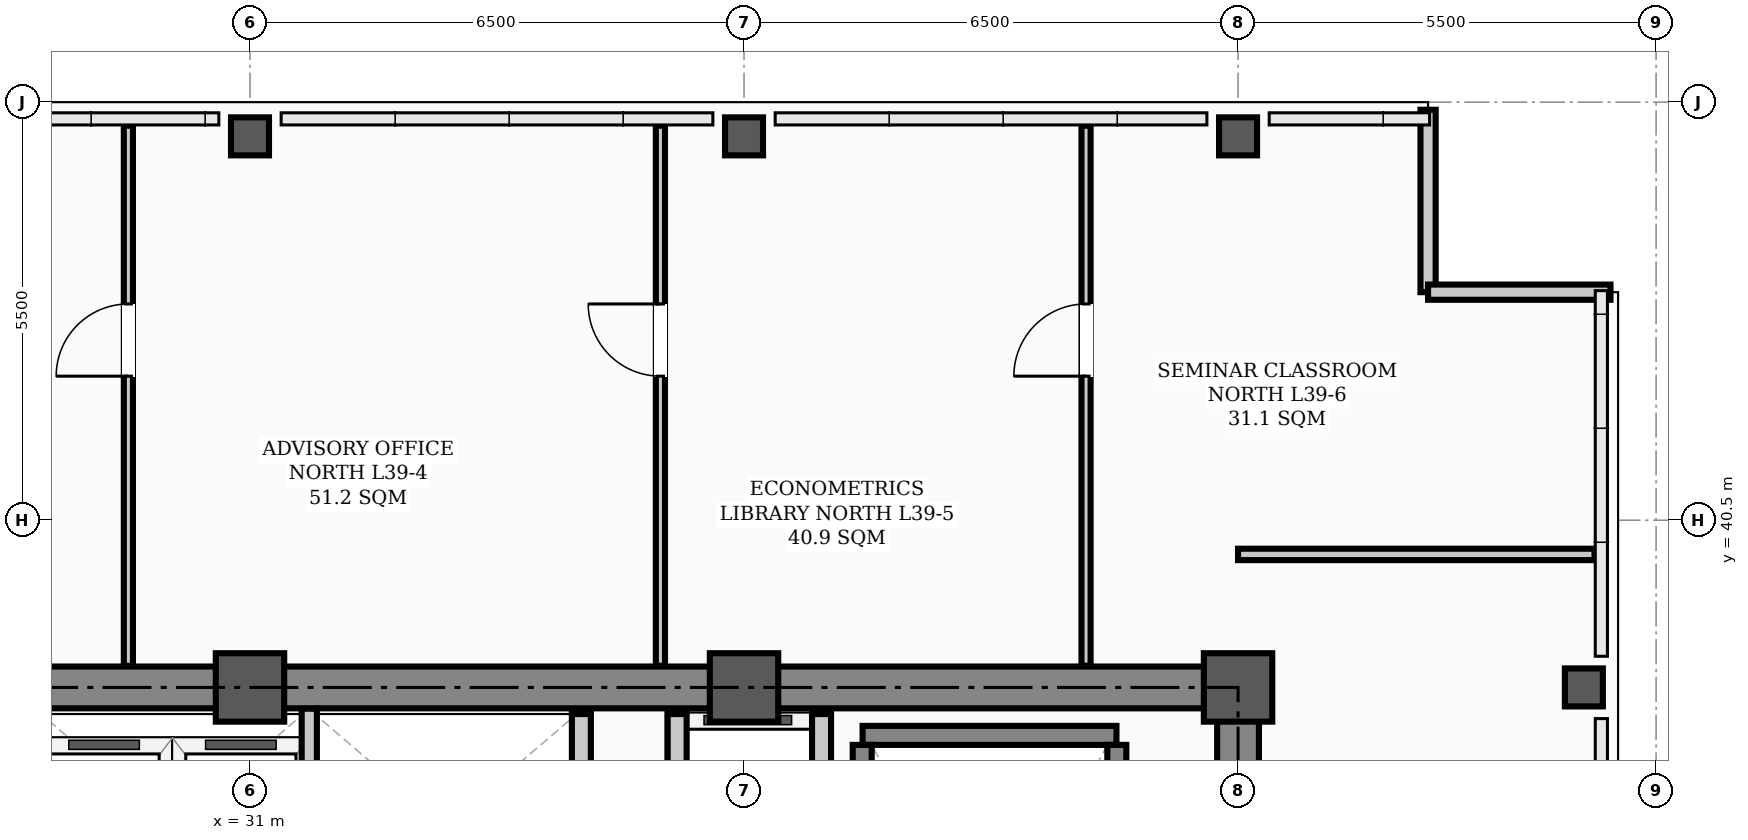
"""IFC4 building model, lengths in metres.
Left out: names, types, materials, properties, quantities, classifications, styles, units other than length and angle.
Written with IfcOpenShell. Run it as: python <this file> out.ifc"""

import sys

from ifc_helpers import new_model, si_unit, direction, frame, frame_2d, origin, origin_2d, place, context, subcontext, project, spatial, rectangle, hollow_rectangle, extrude, element, fill, save


model = new_model("IFC4")
c1 = context("Model", 3, precision=1e-05, world=origin(), true_north=direction((0.0, 1.0)))
c2 = subcontext(c1, "Body", "Model", "MODEL_VIEW")
j1 = project(units=[si_unit("LENGTHUNIT", "METRE"), si_unit("PLANEANGLEUNIT", "RADIAN")], contexts=[c1])
p1 = place(None, origin())
s1 = spatial("IfcSite", under=j1, at=p1, CompositionType="ELEMENT")
p2 = place(p1, origin())
s2 = spatial("IfcBuilding", under=s1, at=p2, CompositionType="ELEMENT")
p3 = place(p2, frame((0.0, 0.0, 157.8)))
s3 = spatial("IfcBuildingStorey", under=s2, at=p3, CompositionType="ELEMENT", Elevation=157.8)
for number, where, z_axis, x_axis in (
    (1, (31.0, 38.3, 0.0), (0.0, 0.0, 1.0), (1.0, 0.0, 0.0)),
    (2, (37.5, 38.3, 0.0), (0.0, 0.0, 1.0), (1.0, 0.0, 0.0)),
    (3, (44.0, 38.3, 0.0), (0.0, 0.0, 1.0), (1.0, 0.0, 0.0)),
):
    element("IfcColumn", number, at=place(p3, frame(where, z_axis=z_axis, x_axis=x_axis)), inside=s3, PredefinedType="COLUMN", context=c2, shape_type="SweptSolid", body=[
        extrude(hollow_rectangle(XDim=0.9, YDim=0.9, WallThickness=0.035, InnerFilletRadius=0.017, OuterFilletRadius=0.052, at=origin_2d()), origin(), (0.0, 0.0, 1.0), 3.9),
    ])
for number, where, z_axis, x_axis in (
    (4, (31.0, 45.55, 0.0), (0.0, 0.0, 1.0), (1.0, 0.0, 0.0)),
    (5, (37.5, 45.55, 0.0), (0.0, 0.0, 1.0), (1.0, 0.0, 0.0)),
    (6, (44.0, 45.55, 0.0), (0.0, 0.0, 1.0), (1.0, 0.0, 0.0)),
    (7, (48.55, 38.3, 0.0), (0.0, 0.0, 1.0), (1.0, 0.0, 0.0)),
):
    element("IfcColumn", number, at=place(p3, frame(where, z_axis=z_axis, x_axis=x_axis)), inside=s3, PredefinedType="COLUMN", context=c2, shape_type="SweptSolid", body=[
        extrude(hollow_rectangle(XDim=0.5, YDim=0.5, WallThickness=0.024, InnerFilletRadius=0.012, OuterFilletRadius=0.036, at=origin_2d()), origin(), (0.0, 0.0, 1.0), 3.9),
    ])
for number, where, z_axis, x_axis in (
    (8, (46.5, 45.9, 0.0), (0.0, 0.0, 1.0), (0.0, -1.0, 0.0)),
    (9, (46.5, 43.5, 0.0), (0.0, 0.0, 1.0), (1.0, 0.0, 0.0)),
):
    element("IfcWall", number, at=place(p3, frame(where, z_axis=z_axis, x_axis=x_axis)), inside=s3, PredefinedType="PARAPET", context=c2, shape_type="SweptSolid", body=[
        extrude(rectangle(XDim=2.4, YDim=0.2, at=frame_2d((1.2, 0.0))), origin(), (0.0, 0.0, 1.0), 1.2),
    ])
p4 = place(p3, frame((13.5, 38.3, 0.0), z_axis=(0.0, 0.0, 1.0), x_axis=(1.0, 0.0, 0.0)))
e10 = element("IfcWall", 10, at=p4, inside=s3, PredefinedType="SHEAR", context=c2, shape_type="SweptSolid", body=[
    extrude(rectangle(XDim=30.5, YDim=0.55, at=frame_2d((15.25, 0.0))), origin(), (0.0, 0.0, 1.0), 3.72),
])
p5 = place(p3, frame((44.0, 29.35, 0.0), z_axis=(0.0, 0.0, 1.0), x_axis=(0.0, 1.0, 0.0)))
e11 = element("IfcWall", 11, at=p5, inside=s3, PredefinedType="SHEAR", context=c2, shape_type="SweptSolid", body=[
    extrude(rectangle(XDim=8.6, YDim=0.55, at=frame_2d((4.3, 0.0))), origin(), (0.0, 0.0, 1.0), 3.72),
])
p6 = place(p3, frame((39.06, 37.669, 0.0), z_axis=(0.0, 0.0, 1.0), x_axis=(1.0, 0.0, 0.0)))
e12 = element("IfcWall", 12, at=p6, inside=s3, PredefinedType="STANDARD", context=c2, shape_type="SweptSolid", body=[
    extrude(rectangle(XDim=3.34, YDim=0.25, at=frame_2d((1.67, 0.0))), origin(), (0.0, 0.0, 1.0), 3.72),
])
for number, where, z_axis, x_axis in (
    (13, (39.055, 30.36, 0.0), (0.0, 0.0, 1.0), (0.0, 1.0, 0.0)),
    (14, (42.405, 30.36, 0.0), (0.0, 0.0, 1.0), (0.0, 1.0, 0.0)),
):
    element("IfcWall", number, at=place(p3, frame(where, z_axis=z_axis, x_axis=x_axis)), inside=s3, PredefinedType="STANDARD", context=c2, shape_type="SweptSolid", body=[
        extrude(rectangle(XDim=7.184, YDim=0.25, at=frame_2d((3.592, 0.0))), origin(), (0.0, 0.0, 1.0), 3.72),
    ])
p7 = place(p3, frame((36.62, 31.95, 0.0), z_axis=(0.0, 0.0, 1.0), x_axis=(0.0, 1.0, 0.0)))
e15 = element("IfcWall", 15, at=p7, inside=s3, PredefinedType="STANDARD", context=c2, shape_type="SweptSolid", body=[
    extrude(rectangle(XDim=6.0, YDim=0.25, at=frame_2d((3.0, 0.0))), origin(), (0.0, 0.0, 1.0), 3.35),
])
p8 = place(p7, frame((0.9, 0.0, 0.0)))
e16 = element("IfcOpeningElement", 16, at=p8, cuts=e15, PredefinedType="OPENING", context=c2, shape_type="SweptSolid", body=[
    extrude(rectangle(XDim=1.1, YDim=2.08, at=frame_2d((0.55, 1.04))), frame((0.0, 0.135, 0.0), z_axis=(0.0, -1.0, 0.0), x_axis=(1.0, 0.0, 0.0)), (0.0, 0.0, 1.0), 0.27),
])
p9 = place(p7, frame((4.0, 0.0, 0.0)))
e17 = element("IfcOpeningElement", 17, at=p9, cuts=e15, PredefinedType="OPENING", context=c2, shape_type="SweptSolid", body=[
    extrude(rectangle(XDim=1.1, YDim=2.08, at=frame_2d((0.55, 1.04))), frame((0.0, 0.135, 0.0), z_axis=(0.0, -1.0, 0.0), x_axis=(1.0, 0.0, 0.0)), (0.0, 0.0, 1.0), 0.27),
])
p10 = place(p3, frame((38.52, 31.95, 0.0), z_axis=(0.0, 0.0, 1.0), x_axis=(0.0, 1.0, 0.0)))
e18 = element("IfcWall", 18, at=p10, inside=s3, PredefinedType="STANDARD", context=c2, shape_type="SweptSolid", body=[
    extrude(rectangle(XDim=6.0, YDim=0.25, at=frame_2d((3.0, 0.0))), origin(), (0.0, 0.0, 1.0), 3.35),
])
p11 = place(p3, frame((35.36, 34.9, 0.0), z_axis=(0.0, 0.0, 1.0), x_axis=(0.0, 1.0, 0.0)))
e19 = element("IfcWall", 19, at=p11, inside=s3, PredefinedType="STANDARD", context=c2, shape_type="SweptSolid", body=[
    extrude(rectangle(XDim=3.05, YDim=0.25, at=frame_2d((1.525, 0.0))), origin(), (0.0, 0.0, 1.0), 3.35),
])
p12 = place(p3, frame((44.0, 40.05, 0.0), z_axis=(0.0, 0.0, 1.0), x_axis=(1.0, 0.0, 0.0)))
e20 = element("IfcWall", 20, at=p12, inside=s3, PredefinedType="PARTITIONING", context=c2, shape_type="SweptSolid", body=[
    extrude(rectangle(XDim=4.69, YDim=0.15, at=frame_2d((2.345, 0.0))), origin(), (0.0, 0.0, 1.0), 3.2),
])
p13 = place(p3, frame((29.4, 38.585, 0.0), z_axis=(0.0, 0.0, 1.0), x_axis=(0.0, 1.0, 0.0)))
e21 = element("IfcWall", 21, at=p13, inside=s3, PredefinedType="PARTITIONING", context=c2, shape_type="SweptSolid", body=[
    extrude(rectangle(XDim=7.105, YDim=0.12, at=frame_2d((3.552, 0.0))), origin(), (0.0, 0.0, 1.0), 3.212),
])
p14 = place(p13, frame((3.81, 0.0, 0.0)))
e22 = element("IfcOpeningElement", 22, at=p14, cuts=e21, PredefinedType="OPENING", context=c2, shape_type="SweptSolid", body=[
    extrude(rectangle(XDim=0.95, YDim=2.08, at=frame_2d((0.475, 1.04))), frame((0.0, 0.07, 0.0), z_axis=(0.0, -1.0, 0.0), x_axis=(1.0, 0.0, 0.0)), (0.0, 0.0, 1.0), 0.14),
])
p15 = place(p3, frame((36.4, 38.585, 0.0), z_axis=(0.0, 0.0, 1.0), x_axis=(0.0, 1.0, 0.0)))
e23 = element("IfcWall", 23, at=p15, inside=s3, PredefinedType="PARTITIONING", context=c2, shape_type="SweptSolid", body=[
    extrude(rectangle(XDim=7.105, YDim=0.12, at=frame_2d((3.552, 0.0))), origin(), (0.0, 0.0, 1.0), 3.212),
])
p16 = place(p15, frame((3.81, 0.0, 0.0)))
e24 = element("IfcOpeningElement", 24, at=p16, cuts=e23, PredefinedType="OPENING", context=c2, shape_type="SweptSolid", body=[
    extrude(rectangle(XDim=0.95, YDim=2.08, at=frame_2d((0.475, 1.04))), frame((0.0, 0.07, 0.0), z_axis=(0.0, -1.0, 0.0), x_axis=(1.0, 0.0, 0.0)), (0.0, 0.0, 1.0), 0.14),
])
p17 = place(p3, frame((42.0, 38.585, 0.0), z_axis=(0.0, 0.0, 1.0), x_axis=(0.0, 1.0, 0.0)))
e25 = element("IfcWall", 25, at=p17, inside=s3, PredefinedType="PARTITIONING", context=c2, shape_type="SweptSolid", body=[
    extrude(rectangle(XDim=7.105, YDim=0.12, at=frame_2d((3.552, 0.0))), origin(), (0.0, 0.0, 1.0), 3.212),
])
p18 = place(p17, frame((3.81, 0.0, 0.0)))
e26 = element("IfcOpeningElement", 26, at=p18, cuts=e25, PredefinedType="OPENING", context=c2, shape_type="SweptSolid", body=[
    extrude(rectangle(XDim=0.95, YDim=2.08, at=frame_2d((0.475, 1.04))), frame((0.0, 0.07, 0.0), z_axis=(0.0, -1.0, 0.0), x_axis=(1.0, 0.0, 0.0)), (0.0, 0.0, 1.0), 0.14),
])
p19 = place(p3, frame((31.78, 34.9, 0.0), z_axis=(0.0, 0.0, 1.0), x_axis=(0.0, 1.0, 0.0)))
e27 = element("IfcWall", 27, at=p19, inside=s3, PredefinedType="STANDARD", context=c2, shape_type="SweptSolid", body=[
    extrude(rectangle(XDim=3.12, YDim=0.2, at=frame_2d((1.56, 0.0))), origin(), (0.0, 0.0, 1.0), 3.35),
])
p20 = place(p14, origin())
e28 = element("IfcDoor", 28, at=p20, inside=s3, OperationType="SINGLE_SWING_LEFT", PredefinedType="DOOR", context=c2, shape_type="SweptSolid", body=[
    extrude(rectangle(XDim=0.95, YDim=2.08, at=frame_2d((0.475, 1.04))), frame((0.0, 0.025, 0.0), z_axis=(0.0, -1.0, 0.0), x_axis=(1.0, 0.0, 0.0)), (0.0, 0.0, 1.0), 0.05),
])
fill(e22, e28)
p21 = place(p16, origin())
e29 = element("IfcDoor", 29, at=p21, inside=s3, OperationType="SINGLE_SWING_RIGHT", PredefinedType="DOOR", context=c2, shape_type="SweptSolid", body=[
    extrude(rectangle(XDim=0.95, YDim=2.08, at=frame_2d((0.475, 1.04))), frame((0.0, 0.025, 0.0), z_axis=(0.0, -1.0, 0.0), x_axis=(1.0, 0.0, 0.0)), (0.0, 0.0, 1.0), 0.05),
])
fill(e24, e29)
p22 = place(p18, origin())
e30 = element("IfcDoor", 30, at=p22, inside=s3, OperationType="SINGLE_SWING_LEFT", PredefinedType="DOOR", context=c2, shape_type="SweptSolid", body=[
    extrude(rectangle(XDim=0.95, YDim=2.08, at=frame_2d((0.475, 1.04))), frame((0.0, 0.025, 0.0), z_axis=(0.0, -1.0, 0.0), x_axis=(1.0, 0.0, 0.0)), (0.0, 0.0, 1.0), 0.05),
])
fill(e26, e30)
save(model, sys.argv[1])
